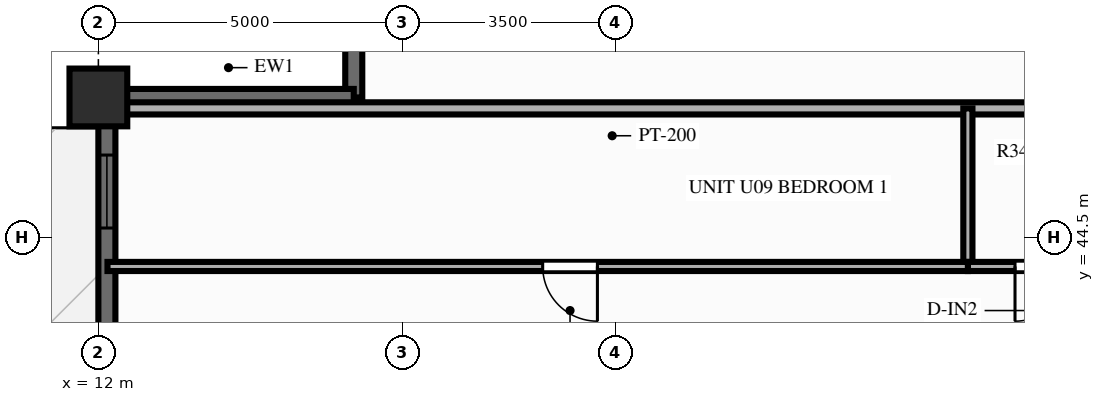
"""IFC4 building model, lengths in metres.
Left out: names, types, materials, properties, quantities, classifications, styles, units other than length and angle.
Written with IfcOpenShell. Run it as: python <this file> out.ifc"""

import sys

from ifc_helpers import new_model, si_unit, direction, frame, frame_2d, origin, origin_2d, place, context, subcontext, project, spatial, rectangle, extrude, source, transform, mapped, element, fill, save


model = new_model("IFC4")
c1 = context("Model", 3, precision=1e-05, world=origin(), true_north=direction((0.0, 1.0)))
c2 = subcontext(c1, "Body", "Model", "MODEL_VIEW")
j1 = project(units=[si_unit("LENGTHUNIT", "METRE"), si_unit("PLANEANGLEUNIT", "RADIAN")], contexts=[c1])
p1 = place(None, origin())
s1 = spatial("IfcSite", under=j1, at=p1, CompositionType="ELEMENT")
p2 = place(p1, origin())
s2 = spatial("IfcBuilding", under=s1, at=p2, CompositionType="ELEMENT")
p3 = place(p2, frame((0.0, 0.0, 110.85)))
s3 = spatial("IfcBuildingStorey", under=s2, at=p3, CompositionType="ELEMENT", Elevation=110.85)
m1 = source(origin(), c2, "Body", "SweptSolid", [
    extrude(rectangle(XDim=0.95, YDim=0.95, at=origin_2d()), origin(), (0.0, 0.0, 1.0), 3.0),
])
p4 = place(p3, frame((12.0, 46.8, 0.0), z_axis=(0.0, 0.0, 1.0), x_axis=(1.0, 0.0, 0.0)))
e1 = element("IfcColumn", 1, at=p4, inside=s3, PredefinedType="COLUMN", context=c2, shape_type="MappedRepresentation", body=[
    mapped(m1, transform((0.0, 0.0, 0.0), scale=1.0)),
])
p5 = place(p3, frame((12.14, 7.2, 0.0), z_axis=(0.0, 0.0, 1.0), x_axis=(0.0, 1.0, 0.0)))
e2 = element("IfcWall", 2, at=p5, inside=s3, PredefinedType="SOLIDWALL", context=c2, shape_type="SweptSolid", body=[
    extrude(rectangle(XDim=39.6, YDim=0.28, at=frame_2d((19.8, 0.0))), origin(), (0.0, 0.0, 1.0), 2.28),
])
p6 = place(p5, frame((0.945, 0.0, 0.25)))
e3 = element("IfcOpeningElement", 3, at=p6, cuts=e2, PredefinedType="OPENING", context=c2, shape_type="SweptSolid", body=[
    extrude(rectangle(XDim=1.2, YDim=1.5, at=frame_2d((0.6, 0.75))), frame((0.0, 0.152, 0.0), z_axis=(0.0, -1.0, 0.0), x_axis=(1.0, 0.0, 0.0)), (0.0, 0.0, 1.0), 0.304),
])
p7 = place(p5, frame((4.213, 0.0, 0.25)))
e4 = element("IfcOpeningElement", 4, at=p7, cuts=e2, PredefinedType="OPENING", context=c2, shape_type="SweptSolid", body=[
    extrude(rectangle(XDim=1.2, YDim=1.5, at=frame_2d((0.6, 0.75))), frame((0.0, 0.152, 0.0), z_axis=(0.0, -1.0, 0.0), x_axis=(1.0, 0.0, 0.0)), (0.0, 0.0, 1.0), 0.304),
])
p8 = place(p5, frame((7.55, 0.0, 0.25)))
e5 = element("IfcOpeningElement", 5, at=p8, cuts=e2, PredefinedType="OPENING", context=c2, shape_type="SweptSolid", body=[
    extrude(rectangle(XDim=1.2, YDim=1.5, at=frame_2d((0.6, 0.75))), frame((0.0, 0.152, 0.0), z_axis=(0.0, -1.0, 0.0), x_axis=(1.0, 0.0, 0.0)), (0.0, 0.0, 1.0), 0.304),
])
p9 = place(p5, frame((13.483, 0.0, 0.25)))
e6 = element("IfcOpeningElement", 6, at=p9, cuts=e2, PredefinedType="OPENING", context=c2, shape_type="SweptSolid", body=[
    extrude(rectangle(XDim=1.2, YDim=1.5, at=frame_2d((0.6, 0.75))), frame((0.0, 0.152, 0.0), z_axis=(0.0, -1.0, 0.0), x_axis=(1.0, 0.0, 0.0)), (0.0, 0.0, 1.0), 0.304),
])
p10 = place(p5, frame((16.82, 0.0, 0.25)))
e7 = element("IfcOpeningElement", 7, at=p10, cuts=e2, PredefinedType="OPENING", context=c2, shape_type="SweptSolid", body=[
    extrude(rectangle(XDim=1.2, YDim=1.5, at=frame_2d((0.6, 0.75))), frame((0.0, 0.152, 0.0), z_axis=(0.0, -1.0, 0.0), x_axis=(1.0, 0.0, 0.0)), (0.0, 0.0, 1.0), 0.304),
])
p11 = place(p5, frame((19.2, 0.0, 0.25)))
e8 = element("IfcOpeningElement", 8, at=p11, cuts=e2, PredefinedType="OPENING", context=c2, shape_type="SweptSolid", body=[
    extrude(rectangle(XDim=1.2, YDim=1.5, at=frame_2d((0.6, 0.75))), frame((0.0, 0.152, 0.0), z_axis=(0.0, -1.0, 0.0), x_axis=(1.0, 0.0, 0.0)), (0.0, 0.0, 1.0), 0.304),
])
p12 = place(p5, frame((21.578, 0.0, 0.25)))
e9 = element("IfcOpeningElement", 9, at=p12, cuts=e2, PredefinedType="OPENING", context=c2, shape_type="SweptSolid", body=[
    extrude(rectangle(XDim=1.2, YDim=1.5, at=frame_2d((0.6, 0.75))), frame((0.0, 0.152, 0.0), z_axis=(0.0, -1.0, 0.0), x_axis=(1.0, 0.0, 0.0)), (0.0, 0.0, 1.0), 0.304),
])
p13 = place(p5, frame((24.713, 0.0, 0.0)))
e10 = element("IfcOpeningElement", 10, at=p13, cuts=e2, PredefinedType="OPENING", context=c2, shape_type="SweptSolid", body=[
    extrude(rectangle(XDim=1.6, YDim=2.15, at=frame_2d((0.8, 1.075))), frame((0.0, 0.152, 0.0), z_axis=(0.0, -1.0, 0.0), x_axis=(1.0, 0.0, 0.0)), (0.0, 0.0, 1.0), 0.304),
])
p14 = place(p5, frame((29.305, 0.0, 0.25)))
e11 = element("IfcOpeningElement", 11, at=p14, cuts=e2, PredefinedType="OPENING", context=c2, shape_type="SweptSolid", body=[
    extrude(rectangle(XDim=0.7, YDim=1.5, at=frame_2d((0.35, 0.75))), frame((0.0, 0.152, 0.0), z_axis=(0.0, -1.0, 0.0), x_axis=(1.0, 0.0, 0.0)), (0.0, 0.0, 1.0), 0.304),
])
p15 = place(p5, frame((30.848, 0.0, 0.25)))
e12 = element("IfcOpeningElement", 12, at=p15, cuts=e2, PredefinedType="OPENING", context=c2, shape_type="SweptSolid", body=[
    extrude(rectangle(XDim=1.2, YDim=1.5, at=frame_2d((0.6, 0.75))), frame((0.0, 0.152, 0.0), z_axis=(0.0, -1.0, 0.0), x_axis=(1.0, 0.0, 0.0)), (0.0, 0.0, 1.0), 0.304),
])
p16 = place(p5, frame((34.183, 0.0, 0.25)))
e13 = element("IfcOpeningElement", 13, at=p16, cuts=e2, PredefinedType="OPENING", context=c2, shape_type="SweptSolid", body=[
    extrude(rectangle(XDim=1.2, YDim=1.5, at=frame_2d((0.6, 0.75))), frame((0.0, 0.152, 0.0), z_axis=(0.0, -1.0, 0.0), x_axis=(1.0, 0.0, 0.0)), (0.0, 0.0, 1.0), 0.304),
])
p17 = place(p5, frame((37.452, 0.0, 0.25)))
e14 = element("IfcOpeningElement", 14, at=p17, cuts=e2, PredefinedType="OPENING", context=c2, shape_type="SweptSolid", body=[
    extrude(rectangle(XDim=1.2, YDim=1.5, at=frame_2d((0.6, 0.75))), frame((0.0, 0.152, 0.0), z_axis=(0.0, -1.0, 0.0), x_axis=(1.0, 0.0, 0.0)), (0.0, 0.0, 1.0), 0.304),
])
for number, where, z_axis, x_axis in (
    (15, (16.2, 46.8, 0.0), (0.0, 0.0, 1.0), (0.0, 1.0, 0.0)),
    (16, (12.08, 46.8, 0.0), (0.0, 0.0, 1.0), (1.0, 0.0, 0.0)),
):
    element("IfcWall", number, at=place(p3, frame(where, z_axis=z_axis, x_axis=x_axis)), inside=s3, PredefinedType="SOLIDWALL", context=c2, shape_type="SweptSolid", body=[
        extrude(rectangle(XDim=4.12, YDim=0.28, at=frame_2d((2.06, 0.0))), origin(), (0.0, 0.0, 1.0), 2.28),
    ])
p18 = place(p3, frame((28.75, 46.62, 0.0), z_axis=(0.0, 0.0, 1.0), x_axis=(-1.0, 0.0, 0.0)))
e17 = element("IfcWall", 17, at=p18, inside=s3, PredefinedType="PARTITIONING", context=c2, shape_type="SweptSolid", body=[
    extrude(rectangle(XDim=16.6, YDim=0.2, at=frame_2d((8.3, 0.0))), origin(), (0.0, 0.0, 1.0), 2.79),
])
p19 = place(p3, frame((26.3, 44.02, 0.0), z_axis=(0.0, 0.0, 1.0), x_axis=(0.0, 1.0, 0.0)))
e18 = element("IfcWall", 18, at=p19, inside=s3, PredefinedType="PARTITIONING", context=c2, shape_type="SweptSolid", body=[
    extrude(rectangle(XDim=2.6, YDim=0.15, at=frame_2d((1.3, 0.0))), origin(), (0.0, 0.0, 1.0), 2.79),
])
p20 = place(p3, frame((28.75, 44.02, 0.0), z_axis=(0.0, 0.0, 1.0), x_axis=(-1.0, 0.0, 0.0)))
e19 = element("IfcWall", 19, at=p20, inside=s3, PredefinedType="PARTITIONING", context=c2, shape_type="SweptSolid", body=[
    extrude(rectangle(XDim=2.45, YDim=0.15, at=frame_2d((1.225, 0.0))), origin(), (0.0, 0.0, 1.0), 2.79),
])
p21 = place(p20, frame((0.775, 0.0, 0.0)))
e20 = element("IfcOpeningElement", 20, at=p21, cuts=e19, PredefinedType="OPENING", context=c2, shape_type="SweptSolid", body=[
    extrude(rectangle(XDim=0.9, YDim=2.1, at=frame_2d((0.45, 1.05))), frame((0.0, 0.087, 0.0), z_axis=(0.0, -1.0, 0.0), x_axis=(1.0, 0.0, 0.0)), (0.0, 0.0, 1.0), 0.174),
])
p22 = place(p3, frame((26.3, 44.02, 0.0), z_axis=(0.0, 0.0, 1.0), x_axis=(-1.0, 0.0, 0.0)))
e21 = element("IfcWall", 21, at=p22, inside=s3, PredefinedType="PARTITIONING", context=c2, shape_type="SweptSolid", body=[
    extrude(rectangle(XDim=14.15, YDim=0.15, at=frame_2d((7.075, 0.0))), origin(), (0.0, 0.0, 1.0), 2.79),
])
p23 = place(p22, frame((6.093, 0.0, 0.0)))
e22 = element("IfcOpeningElement", 22, at=p23, cuts=e21, PredefinedType="OPENING", context=c2, shape_type="SweptSolid", body=[
    extrude(rectangle(XDim=0.9, YDim=2.1, at=frame_2d((0.45, 1.05))), frame((0.0, 0.087, 0.0), z_axis=(0.0, -1.0, 0.0), x_axis=(1.0, 0.0, 0.0)), (0.0, 0.0, 1.0), 0.174),
])
m2 = source(origin(), c2, "Body", "SweptSolid", [
    extrude(rectangle(XDim=1.2, YDim=1.5, at=frame_2d((0.6, 0.75))), frame((0.0, 0.03, 0.0), z_axis=(0.0, -1.0, 0.0), x_axis=(1.0, 0.0, 0.0)), (0.0, 0.0, 1.0), 0.06),
])
p24 = place(p17, origin())
e23 = element("IfcWindow", 23, at=p24, inside=s3, PartitioningType="SINGLE_PANEL", PredefinedType="WINDOW", context=c2, shape_type="MappedRepresentation", body=[
    mapped(m2, transform((0.0, 0.0, 0.0), scale=1.0)),
])
fill(e14, e23)
m3 = source(origin(), c2, "Body", "SweptSolid", [
    extrude(rectangle(XDim=0.9, YDim=2.1, at=frame_2d((0.45, 1.05))), frame((0.0, 0.025, 0.0), z_axis=(0.0, -1.0, 0.0), x_axis=(1.0, 0.0, 0.0)), (0.0, 0.0, 1.0), 0.05),
])
p25 = place(p21, origin())
e24 = element("IfcDoor", 24, at=p25, inside=s3, OperationType="SINGLE_SWING_RIGHT", PredefinedType="DOOR", context=c2, shape_type="MappedRepresentation", body=[
    mapped(m3, transform((0.0, 0.0, 0.0), scale=1.0)),
])
fill(e20, e24)
p26 = place(p23, origin())
e25 = element("IfcDoor", 25, at=p26, inside=s3, OperationType="SINGLE_SWING_LEFT", PredefinedType="DOOR", context=c2, shape_type="MappedRepresentation", body=[
    mapped(m3, transform((0.0, 0.0, 0.0), scale=1.0)),
])
fill(e22, e25)
save(model, sys.argv[1])
